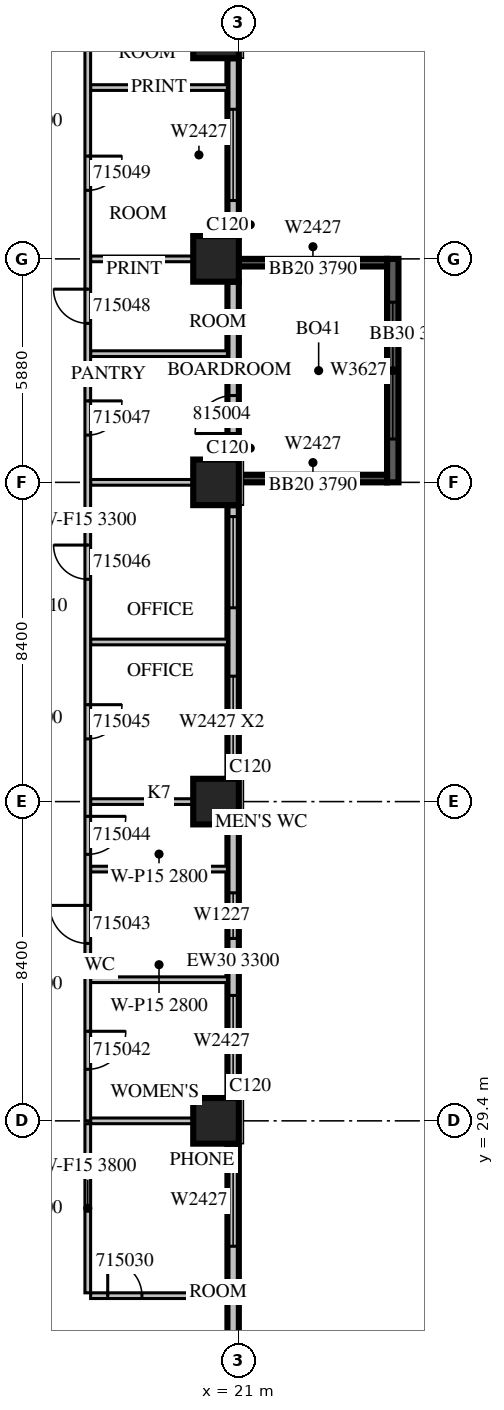
"""IFC4 building model, lengths in metres.
Left out: names, types, materials, properties, quantities, classifications, styles, units other than length and angle.
Written with IfcOpenShell. Run it as: python <this file> out.ifc"""

import sys

from ifc_helpers import new_model, si_unit, direction, frame, frame_2d, origin, origin_2d, place, context, subcontext, project, spatial, rectangle, extrude, source, transform, mapped, element, fill, save


model = new_model("IFC4")
c1 = context("Model", 3, precision=1e-05, world=origin(), true_north=direction((0.0, 1.0)))
c2 = subcontext(c1, "Body", "Model", "MODEL_VIEW")
j1 = project(units=[si_unit("LENGTHUNIT", "METRE"), si_unit("PLANEANGLEUNIT", "RADIAN")], contexts=[c1])
p1 = place(None, origin())
s1 = spatial("IfcSite", under=j1, at=p1, CompositionType="ELEMENT")
p2 = place(p1, origin())
s2 = spatial("IfcBuilding", under=s1, at=p2, CompositionType="ELEMENT")
p3 = place(p2, frame((0.0, 0.0, 74.1)))
s3 = spatial("IfcBuildingStorey", under=s2, at=p3, CompositionType="ELEMENT", Elevation=74.1)
m1 = source(origin(), c2, "Body", "SweptSolid", [
    extrude(rectangle(XDim=1.2, YDim=1.2, at=origin_2d()), origin(), (0.0, 0.0, 1.0), 4.2),
])
for number, where, z_axis, x_axis in (
    (1, (20.4, 29.4, 0.0), (0.0, 0.0, 1.0), (1.0, 0.0, 0.0)),
    (2, (20.4, 37.8, 0.0), (0.0, 0.0, 1.0), (1.0, 0.0, 0.0)),
    (3, (20.4, 46.2, 0.0), (0.0, 0.0, 1.0), (1.0, 0.0, 0.0)),
    (4, (20.4, 52.08, 0.0), (0.0, 0.0, 1.0), (1.0, 0.0, 0.0)),
    (5, (20.4, 57.96, 0.0), (0.0, 0.0, 1.0), (1.0, 0.0, 0.0)),
):
    element("IfcColumn", number, at=place(p3, frame(where, z_axis=z_axis, x_axis=x_axis)), inside=s3, PredefinedType="COLUMN", context=c2, shape_type="MappedRepresentation", body=[
        mapped(m1, transform((0.0, 0.0, 0.0), scale=1.0)),
    ])
m2 = source(origin(), c2, "Body", "SweptSolid", [
    extrude(rectangle(XDim=6.6, YDim=0.3, at=frame_2d((3.3, 0.0))), origin(), (0.0, 0.0, 1.0), 3.8),
])
p4 = place(p3, frame((20.85, 22.2, 0.0), z_axis=(0.0, 0.0, 1.0), x_axis=(0.0, 1.0, 0.0)))
e6 = element("IfcWall", 6, at=p4, inside=s3, PredefinedType="STANDARD", context=c2, shape_type="MappedRepresentation", body=[
    mapped(m2, transform((0.0, 0.0, 0.0), scale=1.0)),
])
m3 = source(origin(), c2, "Body", "SweptSolid", [
    extrude(rectangle(XDim=1.2, YDim=2.7, at=frame_2d((0.6, 1.35))), frame((0.0, 0.16, 0.0), z_axis=(0.0, -1.0, 0.0), x_axis=(1.0, 0.0, 0.0)), (0.0, 0.0, 1.0), 0.32),
])
p5 = place(p4, frame((0.3, 0.0, 0.6)))
e7 = element("IfcOpeningElement", 7, at=p5, cuts=e6, PredefinedType="OPENING", context=c2, shape_type="MappedRepresentation", body=[
    mapped(m3, transform((0.0, 0.0, 0.0), scale=1.0)),
])
m4 = source(origin(), c2, "Body", "SweptSolid", [
    extrude(rectangle(XDim=2.4, YDim=2.7, at=frame_2d((1.2, 1.35))), frame((0.0, 0.16, 0.0), z_axis=(0.0, -1.0, 0.0), x_axis=(1.0, 0.0, 0.0)), (0.0, 0.0, 1.0), 0.32),
])
p6 = place(p4, frame((3.9, 0.0, 0.6)))
e8 = element("IfcOpeningElement", 8, at=p6, cuts=e6, PredefinedType="OPENING", context=c2, shape_type="MappedRepresentation", body=[
    mapped(m4, transform((0.0, 0.0, 0.0), scale=1.0)),
])
m5 = source(origin(), c2, "Body", "SweptSolid", [
    extrude(rectangle(XDim=7.2, YDim=0.3, at=frame_2d((3.6, 0.0))), origin(), (0.0, 0.0, 1.0), 3.3),
])
p7 = place(p3, frame((20.85, 30.0, 0.0), z_axis=(0.0, 0.0, 1.0), x_axis=(0.0, 1.0, 0.0)))
e9 = element("IfcWall", 9, at=p7, inside=s3, PredefinedType="STANDARD", context=c2, shape_type="MappedRepresentation", body=[
    mapped(m5, transform((0.0, 0.0, 0.0), scale=1.0)),
])
p8 = place(p7, frame((0.3, 0.0, 0.6)))
e10 = element("IfcOpeningElement", 10, at=p8, cuts=e9, PredefinedType="OPENING", context=c2, shape_type="MappedRepresentation", body=[
    mapped(m4, transform((0.0, 0.0, 0.0), scale=1.0)),
])
p9 = place(p7, frame((4.199, 0.0, 0.6)))
e11 = element("IfcOpeningElement", 11, at=p9, cuts=e9, PredefinedType="OPENING", context=c2, shape_type="MappedRepresentation", body=[
    mapped(m3, transform((0.0, 0.0, 0.0), scale=1.0)),
])
m6 = source(origin(), c2, "Body", "SweptSolid", [
    extrude(rectangle(XDim=7.2, YDim=0.3, at=frame_2d((3.6, 0.0))), origin(), (0.0, 0.0, 1.0), 3.8),
])
p10 = place(p3, frame((20.85, 38.4, 0.0), z_axis=(0.0, 0.0, 1.0), x_axis=(0.0, 1.0, 0.0)))
e12 = element("IfcWall", 12, at=p10, inside=s3, PredefinedType="STANDARD", context=c2, shape_type="MappedRepresentation", body=[
    mapped(m6, transform((0.0, 0.0, 0.0), scale=1.0)),
])
p11 = place(p10, frame((0.3, 0.0, 0.6)))
e13 = element("IfcOpeningElement", 13, at=p11, cuts=e12, PredefinedType="OPENING", context=c2, shape_type="MappedRepresentation", body=[
    mapped(m4, transform((0.0, 0.0, 0.0), scale=1.0)),
])
p12 = place(p10, frame((4.5, 0.0, 0.6)))
e14 = element("IfcOpeningElement", 14, at=p12, cuts=e12, PredefinedType="OPENING", context=c2, shape_type="MappedRepresentation", body=[
    mapped(m4, transform((0.0, 0.0, 0.0), scale=1.0)),
])
m7 = source(origin(), c2, "Body", "SweptSolid", [
    extrude(rectangle(XDim=4.68, YDim=0.3, at=frame_2d((2.34, 0.0))), origin(), (0.0, 0.0, 1.0), 3.8),
])
p13 = place(p3, frame((20.85, 46.8, 0.0), z_axis=(0.0, 0.0, 1.0), x_axis=(0.0, 1.0, 0.0)))
e15 = element("IfcWall", 15, at=p13, inside=s3, PredefinedType="STANDARD", context=c2, shape_type="MappedRepresentation", body=[
    mapped(m7, transform((0.0, 0.0, 0.0), scale=1.0)),
])
m8 = source(origin(), c2, "Body", "SweptSolid", [
    extrude(rectangle(XDim=1.0, YDim=2.1, at=frame_2d((0.5, 1.05))), frame((0.0, 0.16, 0.0), z_axis=(0.0, -1.0, 0.0), x_axis=(1.0, 0.0, 0.0)), (0.0, 0.0, 1.0), 0.32),
])
p14 = place(p13, frame((0.685, 0.0, 0.0)))
e16 = element("IfcOpeningElement", 16, at=p14, cuts=e15, PredefinedType="OPENING", context=c2, shape_type="MappedRepresentation", body=[
    mapped(m8, transform((0.0, 0.0, 0.0), scale=1.0)),
])
p15 = place(p3, frame((20.85, 52.68, 0.0), z_axis=(0.0, 0.0, 1.0), x_axis=(0.0, 1.0, 0.0)))
e17 = element("IfcWall", 17, at=p15, inside=s3, PredefinedType="STANDARD", context=c2, shape_type="MappedRepresentation", body=[
    mapped(m7, transform((0.0, 0.0, 0.0), scale=1.0)),
])
p16 = place(p15, frame((0.936, 0.0, 0.6)))
e18 = element("IfcOpeningElement", 18, at=p16, cuts=e17, PredefinedType="OPENING", context=c2, shape_type="MappedRepresentation", body=[
    mapped(m4, transform((0.0, 0.0, 0.0), scale=1.0)),
])
m9 = source(origin(), c2, "Body", "SweptSolid", [
    extrude(rectangle(XDim=5.88, YDim=0.3, at=frame_2d((2.94, 0.0))), origin(), (0.0, 0.0, 1.0), 3.79),
])
p17 = place(p3, frame((25.05, 46.2, 0.0), z_axis=(0.0, 0.0, 1.0), x_axis=(0.0, 1.0, 0.0)))
e19 = element("IfcWall", 19, at=p17, inside=s3, PredefinedType="SOLIDWALL", context=c2, shape_type="MappedRepresentation", body=[
    mapped(m9, transform((0.0, 0.0, 0.0), scale=1.0)),
])
m10 = source(origin(), c2, "Body", "SweptSolid", [
    extrude(rectangle(XDim=3.6, YDim=2.7, at=frame_2d((1.8, 1.35))), frame((0.0, 0.16, 0.0), z_axis=(0.0, -1.0, 0.0), x_axis=(1.0, 0.0, 0.0)), (0.0, 0.0, 1.0), 0.32),
])
p18 = place(p17, frame((1.14, 0.0, 0.6)))
e20 = element("IfcOpeningElement", 20, at=p18, cuts=e19, PredefinedType="OPENING", context=c2, shape_type="MappedRepresentation", body=[
    mapped(m10, transform((0.0, 0.0, 0.0), scale=1.0)),
])
m11 = source(origin(), c2, "Body", "SweptSolid", [
    extrude(rectangle(XDim=3.9, YDim=0.2, at=frame_2d((1.95, 0.0))), origin(), (0.0, 0.0, 1.0), 3.79),
])
p19 = place(p3, frame((21.0, 46.3, 0.0), z_axis=(0.0, 0.0, 1.0), x_axis=(1.0, 0.0, 0.0)))
e21 = element("IfcWall", 21, at=p19, inside=s3, PredefinedType="SOLIDWALL", context=c2, shape_type="MappedRepresentation", body=[
    mapped(m11, transform((0.0, 0.0, 0.0), scale=1.0)),
])
m12 = source(origin(), c2, "Body", "SweptSolid", [
    extrude(rectangle(XDim=2.4, YDim=2.7, at=frame_2d((1.2, 1.35))), frame((0.0, 0.11, 0.0), z_axis=(0.0, -1.0, 0.0), x_axis=(1.0, 0.0, 0.0)), (0.0, 0.0, 1.0), 0.22),
])
p20 = place(p19, frame((0.75, 0.0, 0.6)))
e22 = element("IfcOpeningElement", 22, at=p20, cuts=e21, PredefinedType="OPENING", context=c2, shape_type="MappedRepresentation", body=[
    mapped(m12, transform((0.0, 0.0, 0.0), scale=1.0)),
])
p21 = place(p3, frame((21.0, 51.98, 0.0), z_axis=(0.0, 0.0, 1.0), x_axis=(1.0, 0.0, 0.0)))
e23 = element("IfcWall", 23, at=p21, inside=s3, PredefinedType="SOLIDWALL", context=c2, shape_type="MappedRepresentation", body=[
    mapped(m11, transform((0.0, 0.0, 0.0), scale=1.0)),
])
p22 = place(p21, frame((0.75, 0.0, 0.6)))
e24 = element("IfcOpeningElement", 24, at=p22, cuts=e23, PredefinedType="OPENING", context=c2, shape_type="MappedRepresentation", body=[
    mapped(m12, transform((0.0, 0.0, 0.0), scale=1.0)),
])
m13 = source(origin(), c2, "Body", "SweptSolid", [
    extrude(rectangle(XDim=3.6, YDim=0.15, at=frame_2d((1.8, 0.0))), origin(), (0.0, 0.0, 1.0), 3.8),
])
p23 = place(p3, frame((17.1, 24.8, 0.0), z_axis=(0.0, 0.0, 1.0), x_axis=(1.0, 0.0, 0.0)))
e25 = element("IfcWall", 25, at=p23, inside=s3, PredefinedType="PARTITIONING", context=c2, shape_type="MappedRepresentation", body=[
    mapped(m13, transform((0.0, 0.0, 0.0), scale=1.0)),
])
m14 = source(origin(), c2, "Body", "SweptSolid", [
    extrude(rectangle(XDim=0.9, YDim=2.1, at=frame_2d((0.45, 1.05))), frame((0.0, 0.085, 0.0), z_axis=(0.0, -1.0, 0.0), x_axis=(1.0, 0.0, 0.0)), (0.0, 0.0, 1.0), 0.17),
])
p24 = place(p23, frame((0.45, 0.0, 0.0)))
e26 = element("IfcOpeningElement", 26, at=p24, cuts=e25, PredefinedType="OPENING", context=c2, shape_type="MappedRepresentation", body=[
    mapped(m14, transform((0.0, 0.0, 0.0), scale=1.0)),
])
m15 = source(origin(), c2, "Body", "SweptSolid", [
    extrude(rectangle(XDim=4.45, YDim=0.15, at=frame_2d((2.225, 0.0))), origin(), (0.0, 0.0, 1.0), 3.8),
])
p25 = place(p3, frame((17.025, 29.325, 0.0), z_axis=(0.0, 0.0, 1.0), x_axis=(0.0, -1.0, 0.0)))
e27 = element("IfcWall", 27, at=p25, inside=s3, PredefinedType="PARTITIONING", context=c2, shape_type="MappedRepresentation", body=[
    mapped(m15, transform((0.0, 0.0, 0.0), scale=1.0)),
])
m16 = source(origin(), c2, "Body", "SweptSolid", [
    extrude(rectangle(XDim=2.701, YDim=0.15, at=frame_2d((1.351, 0.0))), origin(), (0.0, 0.0, 1.0), 3.8),
])
p26 = place(p3, frame((19.801, 29.4, 0.0), z_axis=(0.0, 0.0, 1.0), x_axis=(-1.0, 0.0, 0.0)))
e28 = element("IfcWall", 28, at=p26, inside=s3, PredefinedType="PARTITIONING", context=c2, shape_type="MappedRepresentation", body=[
    mapped(m16, transform((0.0, 0.0, 0.0), scale=1.0)),
])
m17 = source(origin(), c2, "Body", "SweptSolid", [
    extrude(rectangle(XDim=3.6, YDim=0.15, at=frame_2d((1.8, 0.0))), origin(), (0.0, 0.0, 1.0), 2.8),
])
for number, where, z_axis, x_axis in (
    (29, (17.1, 33.113, 0.0), (0.0, 0.0, 1.0), (1.0, 0.0, 0.0)),
    (30, (17.1, 36.024, 0.0), (0.0, 0.0, 1.0), (1.0, 0.0, 0.0)),
):
    element("IfcWall", number, at=place(p3, frame(where, z_axis=z_axis, x_axis=x_axis)), inside=s3, PredefinedType="PARTITIONING", context=c2, shape_type="MappedRepresentation", body=[
        mapped(m17, transform((0.0, 0.0, 0.0), scale=1.0)),
    ])
for number, where, z_axis, x_axis in (
    (31, (17.1, 42.0, 0.0), (0.0, 0.0, 1.0), (1.0, 0.0, 0.0)),
    (32, (17.1, 49.587, 0.0), (0.0, 0.0, 1.0), (1.0, 0.0, 0.0)),
    (33, (17.1, 56.587, 0.0), (0.0, 0.0, 1.0), (1.0, 0.0, 0.0)),
):
    element("IfcWall", number, at=place(p3, frame(where, z_axis=z_axis, x_axis=x_axis)), inside=s3, PredefinedType="PARTITIONING", context=c2, shape_type="MappedRepresentation", body=[
        mapped(m13, transform((0.0, 0.0, 0.0), scale=1.0)),
    ])
for number, where, z_axis, x_axis in (
    (34, (19.801, 37.8, 0.0), (0.0, 0.0, 1.0), (-1.0, 0.0, 0.0)),
    (35, (19.801, 46.2, 0.0), (0.0, 0.0, 1.0), (-1.0, 0.0, 0.0)),
    (36, (19.801, 52.08, 0.0), (0.0, 0.0, 1.0), (-1.0, 0.0, 0.0)),
):
    element("IfcWall", number, at=place(p3, frame(where, z_axis=z_axis, x_axis=x_axis)), inside=s3, PredefinedType="PARTITIONING", context=c2, shape_type="MappedRepresentation", body=[
        mapped(m16, transform((0.0, 0.0, 0.0), scale=1.0)),
    ])
m18 = source(origin(), c2, "Body", "SweptSolid", [
    extrude(rectangle(XDim=31.62, YDim=0.15, at=frame_2d((15.81, 0.0))), origin(), (0.0, 0.0, 1.0), 3.3),
])
p27 = place(p3, frame((17.025, 61.02, 0.0), z_axis=(0.0, 0.0, 1.0), x_axis=(0.0, -1.0, 0.0)))
e37 = element("IfcWall", 37, at=p27, inside=s3, PredefinedType="PARTITIONING", context=c2, shape_type="MappedRepresentation", body=[
    mapped(m18, transform((0.0, 0.0, 0.0), scale=1.0)),
])
m19 = source(origin(), c2, "Body", "SweptSolid", [
    extrude(rectangle(XDim=1.0, YDim=2.1, at=frame_2d((0.5, 1.05))), frame((0.0, 0.085, 0.0), z_axis=(0.0, -1.0, 0.0), x_axis=(1.0, 0.0, 0.0)), (0.0, 0.0, 1.0), 0.17),
])
p28 = place(p27, frame((29.263, 0.0, 0.0)))
e38 = element("IfcOpeningElement", 38, at=p28, cuts=e37, PredefinedType="OPENING", context=c2, shape_type="MappedRepresentation", body=[
    mapped(m19, transform((0.0, 0.0, 0.0), scale=1.0)),
])
p29 = place(p27, frame((25.951, 0.0, 0.0)))
e39 = element("IfcOpeningElement", 39, at=p29, cuts=e37, PredefinedType="OPENING", context=c2, shape_type="MappedRepresentation", body=[
    mapped(m19, transform((0.0, 0.0, 0.0), scale=1.0)),
])
p30 = place(p27, frame((23.608, 0.0, 0.0)))
e40 = element("IfcOpeningElement", 40, at=p30, cuts=e37, PredefinedType="OPENING", context=c2, shape_type="MappedRepresentation", body=[
    mapped(m19, transform((0.0, 0.0, 0.0), scale=1.0)),
])
p31 = place(p27, frame((20.67, 0.0, 0.0)))
e41 = element("IfcOpeningElement", 41, at=p31, cuts=e37, PredefinedType="OPENING", context=c2, shape_type="MappedRepresentation", body=[
    mapped(m14, transform((0.0, 0.0, 0.0), scale=1.0)),
])
p32 = place(p27, frame((16.47, 0.0, 0.0)))
e42 = element("IfcOpeningElement", 42, at=p32, cuts=e37, PredefinedType="OPENING", context=c2, shape_type="MappedRepresentation", body=[
    mapped(m14, transform((0.0, 0.0, 0.0), scale=1.0)),
])
p33 = place(p27, frame((12.677, 0.0, 0.0)))
e43 = element("IfcOpeningElement", 43, at=p33, cuts=e37, PredefinedType="OPENING", context=c2, shape_type="MappedRepresentation", body=[
    mapped(m14, transform((0.0, 0.0, 0.0), scale=1.0)),
])
p34 = place(p27, frame((9.737, 0.0, 0.0)))
e44 = element("IfcOpeningElement", 44, at=p34, cuts=e37, PredefinedType="OPENING", context=c2, shape_type="MappedRepresentation", body=[
    mapped(m14, transform((0.0, 0.0, 0.0), scale=1.0)),
])
p35 = place(p27, frame((6.236, 0.0, 0.0)))
e45 = element("IfcOpeningElement", 45, at=p35, cuts=e37, PredefinedType="OPENING", context=c2, shape_type="MappedRepresentation", body=[
    mapped(m14, transform((0.0, 0.0, 0.0), scale=1.0)),
])
p36 = place(p27, frame((1.729, 0.0, 0.0)))
e46 = element("IfcOpeningElement", 46, at=p36, cuts=e37, PredefinedType="OPENING", context=c2, shape_type="MappedRepresentation", body=[
    mapped(m14, transform((0.0, 0.0, 0.0), scale=1.0)),
])
m20 = source(origin(), c2, "Body", "SweptSolid", [
    extrude(rectangle(XDim=2.4, YDim=2.7, at=frame_2d((1.2, 1.35))), frame((0.0, 0.03, 0.0), z_axis=(0.0, -1.0, 0.0), x_axis=(1.0, 0.0, 0.0)), (0.0, 0.0, 1.0), 0.06),
])
p37 = place(p6, origin())
e47 = element("IfcWindow", 47, at=p37, inside=s3, PartitioningType="SINGLE_PANEL", PredefinedType="WINDOW", context=c2, shape_type="MappedRepresentation", body=[
    mapped(m20, transform((0.0, 0.0, 0.0), scale=1.0)),
])
fill(e8, e47)
p38 = place(p8, origin())
e48 = element("IfcWindow", 48, at=p38, inside=s3, PartitioningType="SINGLE_PANEL", PredefinedType="WINDOW", context=c2, shape_type="MappedRepresentation", body=[
    mapped(m20, transform((0.0, 0.0, 0.0), scale=1.0)),
])
fill(e10, e48)
m21 = source(origin(), c2, "Body", "SweptSolid", [
    extrude(rectangle(XDim=1.2, YDim=2.7, at=frame_2d((0.6, 1.35))), frame((0.0, 0.03, 0.0), z_axis=(0.0, -1.0, 0.0), x_axis=(1.0, 0.0, 0.0)), (0.0, 0.0, 1.0), 0.06),
])
p39 = place(p9, origin())
e49 = element("IfcWindow", 49, at=p39, inside=s3, PartitioningType="SINGLE_PANEL", PredefinedType="WINDOW", context=c2, shape_type="MappedRepresentation", body=[
    mapped(m21, transform((0.0, 0.0, 0.0), scale=1.0)),
])
fill(e11, e49)
p40 = place(p11, origin())
e50 = element("IfcWindow", 50, at=p40, inside=s3, PartitioningType="SINGLE_PANEL", PredefinedType="WINDOW", context=c2, shape_type="MappedRepresentation", body=[
    mapped(m20, transform((0.0, 0.0, 0.0), scale=1.0)),
])
fill(e13, e50)
p41 = place(p12, origin())
e51 = element("IfcWindow", 51, at=p41, inside=s3, PartitioningType="SINGLE_PANEL", PredefinedType="WINDOW", context=c2, shape_type="MappedRepresentation", body=[
    mapped(m20, transform((0.0, 0.0, 0.0), scale=1.0)),
])
fill(e14, e51)
p42 = place(p16, origin())
e52 = element("IfcWindow", 52, at=p42, inside=s3, PartitioningType="SINGLE_PANEL", PredefinedType="WINDOW", context=c2, shape_type="MappedRepresentation", body=[
    mapped(m20, transform((0.0, 0.0, 0.0), scale=1.0)),
])
fill(e18, e52)
m22 = source(origin(), c2, "Body", "SweptSolid", [
    extrude(rectangle(XDim=3.6, YDim=2.7, at=frame_2d((1.8, 1.35))), frame((0.0, 0.03, 0.0), z_axis=(0.0, -1.0, 0.0), x_axis=(1.0, 0.0, 0.0)), (0.0, 0.0, 1.0), 0.06),
])
p43 = place(p18, origin())
e53 = element("IfcWindow", 53, at=p43, inside=s3, PartitioningType="SINGLE_PANEL", PredefinedType="WINDOW", context=c2, shape_type="MappedRepresentation", body=[
    mapped(m22, transform((0.0, 0.0, 0.0), scale=1.0)),
])
fill(e20, e53)
p44 = place(p20, origin())
e54 = element("IfcWindow", 54, at=p44, inside=s3, PartitioningType="SINGLE_PANEL", PredefinedType="WINDOW", context=c2, shape_type="MappedRepresentation", body=[
    mapped(m20, transform((0.0, 0.0, 0.0), scale=1.0)),
])
fill(e22, e54)
p45 = place(p22, origin())
e55 = element("IfcWindow", 55, at=p45, inside=s3, PartitioningType="SINGLE_PANEL", PredefinedType="WINDOW", context=c2, shape_type="MappedRepresentation", body=[
    mapped(m20, transform((0.0, 0.0, 0.0), scale=1.0)),
])
fill(e24, e55)
m23 = source(origin(), c2, "Body", "SweptSolid", [
    extrude(rectangle(XDim=0.9, YDim=2.1, at=frame_2d((0.45, 1.05))), frame((0.0, 0.025, 0.0), z_axis=(0.0, -1.0, 0.0), x_axis=(1.0, 0.0, 0.0)), (0.0, 0.0, 1.0), 0.05),
])
p46 = place(p24, origin())
e56 = element("IfcDoor", 56, at=p46, inside=s3, OperationType="SINGLE_SWING_LEFT", PredefinedType="DOOR", context=c2, shape_type="MappedRepresentation", body=[
    mapped(m23, transform((0.0, 0.0, 0.0), scale=1.0)),
])
fill(e26, e56)
m24 = source(origin(), c2, "Body", "SweptSolid", [
    extrude(rectangle(XDim=1.0, YDim=2.1, at=frame_2d((0.5, 1.05))), frame((0.0, 0.025, 0.0), z_axis=(0.0, -1.0, 0.0), x_axis=(1.0, 0.0, 0.0)), (0.0, 0.0, 1.0), 0.05),
])
p47 = place(p28, origin())
e57 = element("IfcDoor", 57, at=p47, inside=s3, OperationType="SINGLE_SWING_LEFT", PredefinedType="DOOR", context=c2, shape_type="MappedRepresentation", body=[
    mapped(m24, transform((0.0, 0.0, 0.0), scale=1.0)),
])
fill(e38, e57)
p48 = place(p29, origin())
e58 = element("IfcDoor", 58, at=p48, inside=s3, OperationType="SINGLE_SWING_RIGHT", PredefinedType="DOOR", context=c2, shape_type="MappedRepresentation", body=[
    mapped(m24, transform((0.0, 0.0, 0.0), scale=1.0)),
])
fill(e39, e58)
p49 = place(p30, origin())
e59 = element("IfcDoor", 59, at=p49, inside=s3, OperationType="SINGLE_SWING_LEFT", PredefinedType="DOOR", context=c2, shape_type="MappedRepresentation", body=[
    mapped(m24, transform((0.0, 0.0, 0.0), scale=1.0)),
])
fill(e40, e59)
p50 = place(p31, origin())
e60 = element("IfcDoor", 60, at=p50, inside=s3, OperationType="SINGLE_SWING_LEFT", PredefinedType="DOOR", context=c2, shape_type="MappedRepresentation", body=[
    mapped(m23, transform((0.0, 0.0, 0.0), scale=1.0)),
])
fill(e41, e60)
p51 = place(p32, origin())
e61 = element("IfcDoor", 61, at=p51, inside=s3, OperationType="SINGLE_SWING_RIGHT", PredefinedType="DOOR", context=c2, shape_type="MappedRepresentation", body=[
    mapped(m23, transform((0.0, 0.0, 0.0), scale=1.0)),
])
fill(e42, e61)
p52 = place(p33, origin())
e62 = element("IfcDoor", 62, at=p52, inside=s3, OperationType="SINGLE_SWING_LEFT", PredefinedType="DOOR", context=c2, shape_type="MappedRepresentation", body=[
    mapped(m23, transform((0.0, 0.0, 0.0), scale=1.0)),
])
fill(e43, e62)
p53 = place(p34, origin())
e63 = element("IfcDoor", 63, at=p53, inside=s3, OperationType="SINGLE_SWING_RIGHT", PredefinedType="DOOR", context=c2, shape_type="MappedRepresentation", body=[
    mapped(m23, transform((0.0, 0.0, 0.0), scale=1.0)),
])
fill(e44, e63)
p54 = place(p35, origin())
e64 = element("IfcDoor", 64, at=p54, inside=s3, OperationType="SINGLE_SWING_LEFT", PredefinedType="DOOR", context=c2, shape_type="MappedRepresentation", body=[
    mapped(m23, transform((0.0, 0.0, 0.0), scale=1.0)),
])
fill(e45, e64)
p55 = place(p14, origin())
e65 = element("IfcDoor", 65, at=p55, inside=s3, OperationType="SINGLE_SWING_LEFT", PredefinedType="DOOR", context=c2, shape_type="MappedRepresentation", body=[
    mapped(m24, transform((0.0, 0.0, 0.0), scale=1.0)),
])
fill(e16, e65)
save(model, sys.argv[1])
